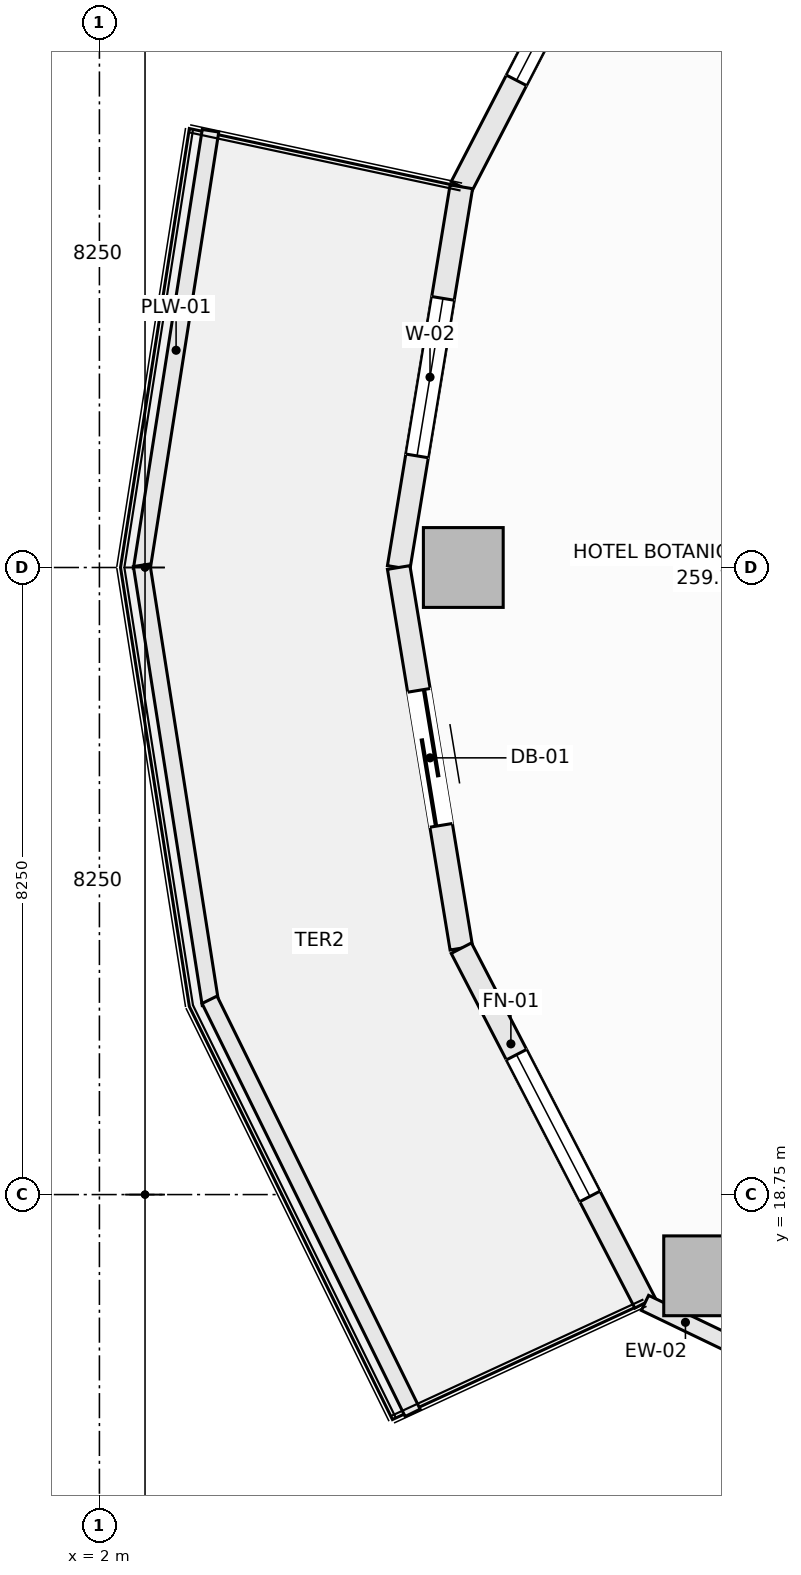
"""IFC4 building model, lengths in metres.
Left out: names, types, materials, properties, quantities, classifications, styles, units other than length and angle.
Written with IfcOpenShell. Run it as: python <this file> out.ifc"""

import sys

from ifc_helpers import new_model, si_unit, direction, frame, frame_2d, origin, origin_2d, place, context, subcontext, project, spatial, rectangle, extrude, element, fill, save


model = new_model("IFC4")
c1 = context("Model", 3, precision=1e-05, world=origin(), true_north=direction((0.0, 1.0)))
c2 = subcontext(c1, "Body", "Model", "MODEL_VIEW")
j1 = project(units=[si_unit("LENGTHUNIT", "METRE"), si_unit("PLANEANGLEUNIT", "RADIAN")], contexts=[c1])
p1 = place(None, origin())
s1 = spatial("IfcSite", under=j1, at=p1, CompositionType="ELEMENT")
p2 = place(p1, origin())
s2 = spatial("IfcBuilding", under=s1, at=p2, CompositionType="ELEMENT")
p3 = place(p2, frame((0.0, 0.0, 108.7)))
s3 = spatial("IfcBuildingStorey", under=s2, at=p3, CompositionType="ELEMENT", Elevation=108.7)
for number, where, z_axis, x_axis in (
    (1, (6.788, 27.0, -0.27), (0.0, 0.0, 1.0), (1.0, 0.0, 0.0)),
    (2, (9.95, 17.681, -0.27), (0.0, 0.0, 1.0), (1.0, 0.0, 0.0)),
):
    element("IfcColumn", number, at=place(p3, frame(where, z_axis=z_axis, x_axis=x_axis)), inside=s3, PredefinedType="COLUMN", context=c2, shape_type="SweptSolid", body=[
        extrude(rectangle(XDim=1.05, YDim=1.05, at=origin_2d()), origin(), (0.0, 0.0, 1.0), 3.4),
    ])
p4 = place(p3, frame((6.762, 32.008, 0.0), z_axis=(0.0, 0.0, 1.0), x_axis=(0.459767899643, 0.888039119892, 0.0)))
e3 = element("IfcWall", 3, at=p4, inside=s3, PredefinedType="SOLIDWALL", context=c2, shape_type="SweptSolid", body=[
    extrude(rectangle(XDim=5.255, YDim=0.3, at=frame_2d((2.628, 0.0))), origin(), (0.0, 0.0, 1.0), 2.653),
])
p5 = place(p4, frame((1.578, 0.0, 0.74)))
e4 = element("IfcOpeningElement", 4, at=p5, cuts=e3, PredefinedType="OPENING", context=c2, shape_type="SweptSolid", body=[
    extrude(rectangle(XDim=2.1, YDim=1.7, at=frame_2d((1.05, 0.85))), frame((0.0, 0.16, 0.0), z_axis=(0.0, -1.0, 0.0), x_axis=(1.0, 0.0, 0.0)), (0.0, 0.0, 1.0), 0.32),
])
p6 = place(p3, frame((5.938, 27.0, 0.0), z_axis=(0.0, 0.0, 1.0), x_axis=(0.162393944769, 0.986726003864, 0.0)))
e5 = element("IfcWall", 5, at=p6, inside=s3, PredefinedType="SOLIDWALL", context=c2, shape_type="SweptSolid", body=[
    extrude(rectangle(XDim=5.075, YDim=0.3, at=frame_2d((2.538, 0.0))), origin(), (0.0, 0.0, 1.0), 2.653),
])
p7 = place(p6, frame((1.488, 0.0, 0.74)))
e6 = element("IfcOpeningElement", 6, at=p7, cuts=e5, PredefinedType="OPENING", context=c2, shape_type="SweptSolid", body=[
    extrude(rectangle(XDim=2.1, YDim=1.7, at=frame_2d((1.05, 0.85))), frame((0.0, 0.16, 0.0), z_axis=(0.0, -1.0, 0.0), x_axis=(1.0, 0.0, 0.0)), (0.0, 0.0, 1.0), 0.32),
])
p8 = place(p3, frame((5.938, 27.0, 0.0), z_axis=(0.0, 0.0, 1.0), x_axis=(0.162393944769, -0.986726003864, 0.0)))
e7 = element("IfcWall", 7, at=p8, inside=s3, PredefinedType="SOLIDWALL", context=c2, shape_type="SweptSolid", body=[
    extrude(rectangle(XDim=5.075, YDim=0.3, at=frame_2d((2.538, 0.0))), origin(), (0.0, 0.0, 1.0), 2.653),
])
p9 = place(p8, frame((1.638, 0.0, 0.0)))
e8 = element("IfcOpeningElement", 8, at=p9, cuts=e7, PredefinedType="OPENING", context=c2, shape_type="SweptSolid", body=[
    extrude(rectangle(XDim=1.8, YDim=2.25, at=frame_2d((0.9, 1.125))), frame((0.0, 0.16, 0.0), z_axis=(0.0, -1.0, 0.0), x_axis=(1.0, 0.0, 0.0)), (0.0, 0.0, 1.0), 0.32),
])
p10 = place(p3, frame((6.762, 21.992, 0.0), z_axis=(0.0, 0.0, 1.0), x_axis=(0.459767899643, -0.888039119892, 0.0)))
e9 = element("IfcWall", 9, at=p10, inside=s3, PredefinedType="SOLIDWALL", context=c2, shape_type="SweptSolid", body=[
    extrude(rectangle(XDim=5.255, YDim=0.3, at=frame_2d((2.628, 0.0))), origin(), (0.0, 0.0, 1.0), 2.653),
])
p11 = place(p10, frame((1.578, 0.0, 0.74)))
e10 = element("IfcOpeningElement", 10, at=p11, cuts=e9, PredefinedType="OPENING", context=c2, shape_type="SweptSolid", body=[
    extrude(rectangle(XDim=2.1, YDim=1.7, at=frame_2d((1.05, 0.85))), frame((0.0, 0.16, 0.0), z_axis=(0.0, -1.0, 0.0), x_axis=(1.0, 0.0, 0.0)), (0.0, 0.0, 1.0), 0.32),
])
p12 = place(p3, frame((9.178, 17.325, 0.0), z_axis=(0.0, 0.0, 1.0), x_axis=(0.901426247285, -0.432932697664, 0.0)))
e11 = element("IfcWall", 11, at=p12, inside=s3, PredefinedType="SOLIDWALL", context=c2, shape_type="SweptSolid", body=[
    extrude(rectangle(XDim=1.181, YDim=0.22, at=frame_2d((0.59, 0.0))), origin(), (0.0, 0.0, 1.0), 2.653),
])
for number, where, z_axis, x_axis in (
    (12, (2.556, 26.971, 0.0), (0.0, 0.0, 1.0), (0.155, 0.988, 0.0)),
    (13, (2.556, 27.029, 0.0), (0.0, 0.0, 1.0), (0.155, -0.988, 0.0)),
):
    element("IfcWall", number, at=place(p3, frame(where, z_axis=z_axis, x_axis=x_axis)), inside=s3, PredefinedType="PARAPET", context=c2, shape_type="SweptSolid", body=[
        extrude(rectangle(XDim=5.846, YDim=0.22, at=frame_2d((2.923, 0.0))), origin(), (0.0, 0.0, 1.0), 0.52),
    ])
p13 = place(p3, frame((3.449, 21.313, 0.0), z_axis=(0.0, 0.0, 1.0), x_axis=(0.441269631716, -0.897374566235, 0.0)))
e14 = element("IfcWall", 14, at=p13, inside=s3, PredefinedType="PARAPET", context=c2, shape_type="SweptSolid", body=[
    extrude(rectangle(XDim=6.056, YDim=0.22, at=frame_2d((3.028, 0.0))), origin(), (0.0, 0.0, 1.0), 0.52),
])
p14 = place(p5, origin())
e15 = element("IfcWindow", 15, at=p14, inside=s3, PartitioningType="SINGLE_PANEL", PredefinedType="WINDOW", context=c2, shape_type="SweptSolid", body=[
    extrude(rectangle(XDim=2.1, YDim=1.7, at=frame_2d((1.05, 0.85))), frame((0.0, 0.03, 0.0), z_axis=(0.0, -1.0, 0.0), x_axis=(1.0, 0.0, 0.0)), (0.0, 0.0, 1.0), 0.06),
])
fill(e4, e15)
p15 = place(p7, origin())
e16 = element("IfcWindow", 16, at=p15, inside=s3, PartitioningType="SINGLE_PANEL", PredefinedType="WINDOW", context=c2, shape_type="SweptSolid", body=[
    extrude(rectangle(XDim=2.1, YDim=1.7, at=frame_2d((1.05, 0.85))), frame((0.0, 0.03, 0.0), z_axis=(0.0, -1.0, 0.0), x_axis=(1.0, 0.0, 0.0)), (0.0, 0.0, 1.0), 0.06),
])
fill(e6, e16)
p16 = place(p9, frame((1.8, 0.0, 0.0), z_axis=(0.0, 0.0, 1.0), x_axis=(-1.0, 0.0, 0.0)))
e17 = element("IfcDoor", 17, at=p16, inside=s3, OperationType="SLIDING_TO_LEFT", PredefinedType="DOOR", context=c2, shape_type="SweptSolid", body=[
    extrude(rectangle(XDim=1.8, YDim=2.25, at=frame_2d((0.9, 1.125))), frame((0.0, 0.025, 0.0), z_axis=(0.0, -1.0, 0.0), x_axis=(1.0, 0.0, 0.0)), (0.0, 0.0, 1.0), 0.05),
])
fill(e8, e17)
p17 = place(p11, origin())
e18 = element("IfcWindow", 18, at=p17, inside=s3, PartitioningType="SINGLE_PANEL", PredefinedType="WINDOW", context=c2, shape_type="SweptSolid", body=[
    extrude(rectangle(XDim=2.1, YDim=1.7, at=frame_2d((1.05, 0.85))), frame((0.0, 0.03, 0.0), z_axis=(0.0, -1.0, 0.0), x_axis=(1.0, 0.0, 0.0)), (0.0, 0.0, 1.0), 0.06),
])
fill(e10, e18)
save(model, sys.argv[1])
